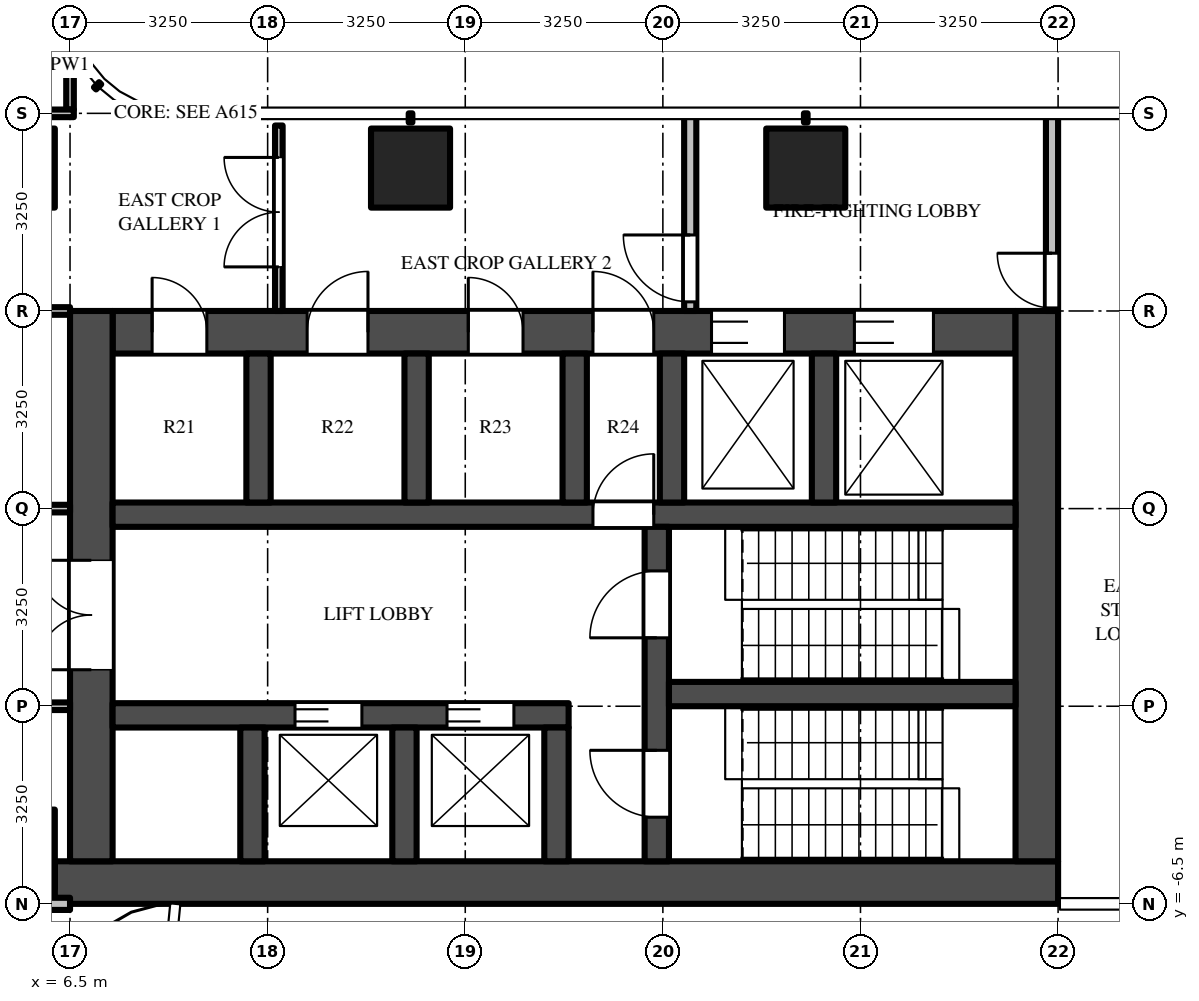
"""IFC4 building model, lengths in metres.
Left out: names, types, materials, properties, quantities, classifications, styles, units other than length and angle.
Written with IfcOpenShell. Run it as: python <this file> out.ifc"""

import sys

from ifc_helpers import new_model, si_unit, direction, frame, frame_2d, origin, origin_2d, place, context, subcontext, project, spatial, rectangle, extrude, source, transform, mapped, element, fill, save


model = new_model("IFC4")
c1 = context("Model", 3, precision=1e-05, world=origin(), true_north=direction((0.0, 1.0)))
c2 = subcontext(c1, "Body", "Model", "MODEL_VIEW")
j1 = project(units=[si_unit("LENGTHUNIT", "METRE"), si_unit("PLANEANGLEUNIT", "RADIAN")], contexts=[c1])
p1 = place(None, origin())
s1 = spatial("IfcSite", under=j1, at=p1, CompositionType="ELEMENT")
p2 = place(p1, origin())
s2 = spatial("IfcBuilding", under=s1, at=p2, CompositionType="ELEMENT")
p3 = place(p2, frame((0.0, 0.0, 124.5)))
s3 = spatial("IfcBuildingStorey", under=s2, at=p3, CompositionType="ELEMENT", Elevation=124.5)
m1 = source(origin(), c2, "Body", "SweptSolid", [
    extrude(rectangle(XDim=1.3, YDim=1.3, at=origin_2d()), origin(), (0.0, 0.0, 1.0), 4.5),
])
for number, where, z_axis, x_axis in (
    (1, (12.1, 5.6, 0.0), (0.0, 0.0, 1.0), (1.0, 0.0, 0.0)),
    (2, (18.6, 5.6, 0.0), (0.0, 0.0, 1.0), (1.0, 0.0, 0.0)),
    (3, (5.6, 5.6, 0.0), (0.0, 0.0, 1.0), (1.0, 0.0, 0.0)),
    (4, (5.6, -5.6, 0.0), (0.0, 0.0, 1.0), (1.0, 0.0, 0.0)),
):
    element("IfcColumn", number, at=place(p3, frame(where, z_axis=z_axis, x_axis=x_axis)), inside=s3, PredefinedType="COLUMN", context=c2, shape_type="MappedRepresentation", body=[
        mapped(m1, transform((0.0, 0.0, 0.0))),
    ])
m2 = source(origin(), c2, "Body", "SweptSolid", [
    extrude(rectangle(XDim=16.5, YDim=0.7, at=frame_2d((8.25, 0.0))), origin(), (0.0, 0.0, 1.0), 4.25),
])
p4 = place(p3, frame((6.25, -6.15, 0.0), z_axis=(0.0, 0.0, 1.0), x_axis=(1.0, 0.0, 0.0)))
e5 = element("IfcWall", 5, at=p4, inside=s3, PredefinedType="SHEAR", context=c2, shape_type="MappedRepresentation", body=[
    mapped(m2, transform((0.0, 0.0, 0.0))),
])
m3 = source(origin(), c2, "Body", "SweptSolid", [
    extrude(rectangle(XDim=14.85, YDim=0.7, at=frame_2d((7.425, 0.0))), origin(), (0.0, 0.0, 1.0), 4.25),
])
p5 = place(p3, frame((7.2, 2.9, 0.0), z_axis=(0.0, 0.0, 1.0), x_axis=(1.0, 0.0, 0.0)))
e6 = element("IfcWall", 6, at=p5, inside=s3, PredefinedType="SHEAR", context=c2, shape_type="MappedRepresentation", body=[
    mapped(m3, transform((0.0, 0.0, 0.0))),
])
m4 = source(origin(), c2, "Body", "SweptSolid", [
    extrude(rectangle(XDim=1.3, YDim=2.1, at=frame_2d((0.65, 1.05))), frame((0.0, 0.36, 0.0), z_axis=(0.0, -1.0, 0.0), x_axis=(1.0, 0.0, 0.0)), (0.0, 0.0, 1.0), 0.72),
])
p6 = place(p5, frame((12.2, 0.0, 0.0)))
e7 = element("IfcOpeningElement", 7, at=p6, cuts=e6, PredefinedType="OPENING", context=c2, shape_type="MappedRepresentation", body=[
    mapped(m4, transform((0.0, 0.0, 0.0))),
])
m5 = source(origin(), c2, "Body", "SweptSolid", [
    extrude(rectangle(XDim=1.2, YDim=2.1, at=frame_2d((0.6, 1.05))), frame((0.0, 0.36, 0.0), z_axis=(0.0, -1.0, 0.0), x_axis=(1.0, 0.0, 0.0)), (0.0, 0.0, 1.0), 0.72),
])
p7 = place(p5, frame((9.85, 0.0, 0.0)))
e8 = element("IfcOpeningElement", 8, at=p7, cuts=e6, PredefinedType="OPENING", context=c2, shape_type="MappedRepresentation", body=[
    mapped(m5, transform((0.0, 0.0, 0.0))),
])
m6 = source(origin(), c2, "Body", "SweptSolid", [
    extrude(rectangle(XDim=1.0, YDim=2.1, at=frame_2d((0.5, 1.05))), frame((0.0, 0.36, 0.0), z_axis=(0.0, -1.0, 0.0), x_axis=(1.0, 0.0, 0.0)), (0.0, 0.0, 1.0), 0.72),
])
p8 = place(p5, frame((7.9, 0.0, 0.0)))
e9 = element("IfcOpeningElement", 9, at=p8, cuts=e6, PredefinedType="OPENING", context=c2, shape_type="MappedRepresentation", body=[
    mapped(m6, transform((0.0, 0.0, 0.0))),
])
m7 = source(origin(), c2, "Body", "SweptSolid", [
    extrude(rectangle(XDim=0.9, YDim=2.1, at=frame_2d((0.45, 1.05))), frame((0.0, 0.36, 0.0), z_axis=(0.0, -1.0, 0.0), x_axis=(1.0, 0.0, 0.0)), (0.0, 0.0, 1.0), 0.72),
])
p9 = place(p5, frame((0.65, 0.0, 0.0)))
e10 = element("IfcOpeningElement", 10, at=p9, cuts=e6, PredefinedType="OPENING", context=c2, shape_type="MappedRepresentation", body=[
    mapped(m7, transform((0.0, 0.0, 0.0))),
])
p10 = place(p5, frame((3.2, 0.0, 0.0)))
e11 = element("IfcOpeningElement", 11, at=p10, cuts=e6, PredefinedType="OPENING", context=c2, shape_type="MappedRepresentation", body=[
    mapped(m6, transform((0.0, 0.0, 0.0))),
])
p11 = place(p5, frame((5.85, 0.0, 0.0)))
e12 = element("IfcOpeningElement", 12, at=p11, cuts=e6, PredefinedType="OPENING", context=c2, shape_type="MappedRepresentation", body=[
    mapped(m7, transform((0.0, 0.0, 0.0))),
])
m8 = source(origin(), c2, "Body", "SweptSolid", [
    extrude(rectangle(XDim=9.05, YDim=0.7, at=frame_2d((4.525, 0.0))), origin(), (0.0, 0.0, 1.0), 4.25),
])
p12 = place(p3, frame((6.85, -5.8, 0.0), z_axis=(0.0, 0.0, 1.0), x_axis=(0.0, 1.0, 0.0)))
e13 = element("IfcWall", 13, at=p12, inside=s3, PredefinedType="SHEAR", context=c2, shape_type="MappedRepresentation", body=[
    mapped(m8, transform((0.0, 0.0, 0.0))),
])
m9 = source(origin(), c2, "Body", "SweptSolid", [
    extrude(rectangle(XDim=1.8, YDim=2.1, at=frame_2d((0.9, 1.05))), frame((0.0, 0.36, 0.0), z_axis=(0.0, -1.0, 0.0), x_axis=(1.0, 0.0, 0.0)), (0.0, 0.0, 1.0), 0.72),
])
p13 = place(p12, frame((3.15, 0.0, 0.0)))
e14 = element("IfcOpeningElement", 14, at=p13, cuts=e13, PredefinedType="OPENING", context=c2, shape_type="MappedRepresentation", body=[
    mapped(m9, transform((0.0, 0.0, 0.0))),
])
p14 = place(p3, frame((22.4, -5.8, 0.0), z_axis=(0.0, 0.0, 1.0), x_axis=(0.0, 1.0, 0.0)))
e15 = element("IfcWall", 15, at=p14, inside=s3, PredefinedType="SHEAR", context=c2, shape_type="MappedRepresentation", body=[
    mapped(m8, transform((0.0, 0.0, 0.0))),
])
m10 = source(origin(), c2, "Body", "SweptSolid", [
    extrude(rectangle(XDim=7.5, YDim=0.4, at=frame_2d((3.75, 0.0))), origin(), (0.0, 0.0, 1.0), 4.25),
])
p15 = place(p3, frame((7.2, -3.4, 0.0), z_axis=(0.0, 0.0, 1.0), x_axis=(1.0, 0.0, 0.0)))
e16 = element("IfcWall", 16, at=p15, inside=s3, PredefinedType="SHEAR", context=c2, shape_type="MappedRepresentation", body=[
    mapped(m10, transform((0.0, 0.0, 0.0))),
])
m11 = source(origin(), c2, "Body", "SweptSolid", [
    extrude(rectangle(XDim=1.1, YDim=2.1, at=frame_2d((0.55, 1.05))), frame((0.0, 0.21, 0.0), z_axis=(0.0, -1.0, 0.0), x_axis=(1.0, 0.0, 0.0)), (0.0, 0.0, 1.0), 0.42),
])
p16 = place(p15, frame((3.0, 0.0, 0.0)))
e17 = element("IfcOpeningElement", 17, at=p16, cuts=e16, PredefinedType="OPENING", context=c2, shape_type="MappedRepresentation", body=[
    mapped(m11, transform((0.0, 0.0, 0.0))),
])
p17 = place(p15, frame((5.5, 0.0, 0.0)))
e18 = element("IfcOpeningElement", 18, at=p17, cuts=e16, PredefinedType="OPENING", context=c2, shape_type="MappedRepresentation", body=[
    mapped(m11, transform((0.0, 0.0, 0.0))),
])
m12 = source(origin(), c2, "Body", "SweptSolid", [
    extrude(rectangle(XDim=14.85, YDim=0.4, at=frame_2d((7.425, 0.0))), origin(), (0.0, 0.0, 1.0), 4.25),
])
p18 = place(p3, frame((7.2, -0.1, 0.0), z_axis=(0.0, 0.0, 1.0), x_axis=(1.0, 0.0, 0.0)))
e19 = element("IfcWall", 19, at=p18, inside=s3, PredefinedType="SHEAR", context=c2, shape_type="MappedRepresentation", body=[
    mapped(m12, transform((0.0, 0.0, 0.0))),
])
m13 = source(origin(), c2, "Body", "SweptSolid", [
    extrude(rectangle(XDim=1.0, YDim=2.1, at=frame_2d((0.5, 1.05))), frame((0.0, 0.21, 0.0), z_axis=(0.0, -1.0, 0.0), x_axis=(1.0, 0.0, 0.0)), (0.0, 0.0, 1.0), 0.42),
])
p19 = place(p18, frame((7.9, 0.0, 0.0)))
e20 = element("IfcOpeningElement", 20, at=p19, cuts=e19, PredefinedType="OPENING", context=c2, shape_type="MappedRepresentation", body=[
    mapped(m13, transform((0.0, 0.0, 0.0))),
])
m14 = source(origin(), c2, "Body", "SweptSolid", [
    extrude(rectangle(XDim=5.5, YDim=0.4, at=frame_2d((2.75, 0.0))), origin(), (0.0, 0.0, 1.0), 4.25),
])
p20 = place(p3, frame((16.15, -5.8, 0.0), z_axis=(0.0, 0.0, 1.0), x_axis=(0.0, 1.0, 0.0)))
e21 = element("IfcWall", 21, at=p20, inside=s3, PredefinedType="SHEAR", context=c2, shape_type="MappedRepresentation", body=[
    mapped(m14, transform((0.0, 0.0, 0.0))),
])
p21 = place(p20, frame((0.725, 0.0, 0.0)))
e22 = element("IfcOpeningElement", 22, at=p21, cuts=e21, PredefinedType="OPENING", context=c2, shape_type="MappedRepresentation", body=[
    mapped(m11, transform((0.0, 0.0, 0.0))),
])
p22 = place(p20, frame((3.675, 0.0, 0.0)))
e23 = element("IfcOpeningElement", 23, at=p22, cuts=e21, PredefinedType="OPENING", context=c2, shape_type="MappedRepresentation", body=[
    mapped(m11, transform((0.0, 0.0, 0.0))),
])
m15 = source(origin(), c2, "Body", "SweptSolid", [
    extrude(rectangle(XDim=5.7, YDim=0.4, at=frame_2d((2.85, 0.0))), origin(), (0.0, 0.0, 1.0), 4.25),
])
p23 = place(p3, frame((16.35, -3.05, 0.0), z_axis=(0.0, 0.0, 1.0), x_axis=(1.0, 0.0, 0.0)))
e24 = element("IfcWall", 24, at=p23, inside=s3, PredefinedType="SHEAR", context=c2, shape_type="MappedRepresentation", body=[
    mapped(m15, transform((0.0, 0.0, 0.0))),
])
m16 = source(origin(), c2, "Body", "SweptSolid", [
    extrude(rectangle(XDim=2.2, YDim=0.4, at=frame_2d((1.1, 0.0))), origin(), (0.0, 0.0, 1.0), 4.25),
])
for number, where, z_axis, x_axis in (
    (25, (9.5, -5.8, 0.0), (0.0, 0.0, 1.0), (0.0, 1.0, 0.0)),
    (26, (12.0, -5.8, 0.0), (0.0, 0.0, 1.0), (0.0, 1.0, 0.0)),
    (27, (14.5, -5.8, 0.0), (0.0, 0.0, 1.0), (0.0, 1.0, 0.0)),
):
    element("IfcWall", number, at=place(p3, frame(where, z_axis=z_axis, x_axis=x_axis)), inside=s3, PredefinedType="SHEAR", context=c2, shape_type="MappedRepresentation", body=[
        mapped(m16, transform((0.0, 0.0, 0.0))),
    ])
m17 = source(origin(), c2, "Body", "SweptSolid", [
    extrude(rectangle(XDim=2.45, YDim=0.4, at=frame_2d((1.225, 0.0))), origin(), (0.0, 0.0, 1.0), 4.25),
])
for number, where, z_axis, x_axis in (
    (28, (9.6, 0.1, 0.0), (0.0, 0.0, 1.0), (0.0, 1.0, 0.0)),
    (29, (12.2, 0.1, 0.0), (0.0, 0.0, 1.0), (0.0, 1.0, 0.0)),
    (30, (14.8, 0.1, 0.0), (0.0, 0.0, 1.0), (0.0, 1.0, 0.0)),
    (31, (16.4, 0.1, 0.0), (0.0, 0.0, 1.0), (0.0, 1.0, 0.0)),
    (32, (18.9, 0.1, 0.0), (0.0, 0.0, 1.0), (0.0, 1.0, 0.0)),
):
    element("IfcWall", number, at=place(p3, frame(where, z_axis=z_axis, x_axis=x_axis)), inside=s3, PredefinedType="SHEAR", context=c2, shape_type="MappedRepresentation", body=[
        mapped(m17, transform((0.0, 0.0, 0.0))),
    ])
m18 = source(origin(), c2, "Body", "SweptSolid", [
    extrude(rectangle(XDim=3.25, YDim=0.2, at=frame_2d((1.625, 0.0))), origin(), (0.0, 0.0, 1.0), 4.25),
])
p24 = place(p3, frame((16.7, 3.25, 0.0), z_axis=(0.0, 0.0, 1.0), x_axis=(0.0, 1.0, 0.0)))
e33 = element("IfcWall", 33, at=p24, inside=s3, PredefinedType="PARTITIONING", context=c2, shape_type="MappedRepresentation", body=[
    mapped(m18, transform((0.0, 0.0, 0.0))),
])
m19 = source(origin(), c2, "Body", "SweptSolid", [
    extrude(rectangle(XDim=1.1, YDim=2.1, at=frame_2d((0.55, 1.05))), frame((0.0, 0.11, 0.0), z_axis=(0.0, -1.0, 0.0), x_axis=(1.0, 0.0, 0.0)), (0.0, 0.0, 1.0), 0.22),
])
p25 = place(p24, frame((0.15, 0.0, 0.0)))
e34 = element("IfcOpeningElement", 34, at=p25, cuts=e33, PredefinedType="OPENING", context=c2, shape_type="MappedRepresentation", body=[
    mapped(m19, transform((0.0, 0.0, 0.0))),
])
p26 = place(p3, frame((22.65, 3.25, 0.0), z_axis=(0.0, 0.0, 1.0), x_axis=(0.0, 1.0, 0.0)))
e35 = element("IfcWall", 35, at=p26, inside=s3, PredefinedType="PARTITIONING", context=c2, shape_type="MappedRepresentation", body=[
    mapped(m18, transform((0.0, 0.0, 0.0))),
])
m20 = source(origin(), c2, "Body", "SweptSolid", [
    extrude(rectangle(XDim=0.9, YDim=2.1, at=frame_2d((0.45, 1.05))), frame((0.0, 0.11, 0.0), z_axis=(0.0, -1.0, 0.0), x_axis=(1.0, 0.0, 0.0)), (0.0, 0.0, 1.0), 0.22),
])
p27 = place(p26, frame((0.05, 0.0, 0.0)))
e36 = element("IfcOpeningElement", 36, at=p27, cuts=e35, PredefinedType="OPENING", context=c2, shape_type="MappedRepresentation", body=[
    mapped(m20, transform((0.0, 0.0, 0.0))),
])
m21 = source(origin(), c2, "Body", "SweptSolid", [
    extrude(rectangle(XDim=1.469, YDim=0.125, at=frame_2d((0.734, 0.0))), origin(), (0.0, 0.0, 1.0), 4.25),
])
p28 = place(p3, frame((6.5, 6.562, 0.0), z_axis=(0.0, 0.0, 1.0), x_axis=(0.0, 1.0, 0.0)))
e37 = element("IfcWall", 37, at=p28, inside=s3, PredefinedType="PARTITIONING", context=c2, shape_type="MappedRepresentation", body=[
    mapped(m21, transform((0.0, 0.0, 0.0))),
])
m22 = source(origin(), c2, "Body", "SweptSolid", [
    extrude(rectangle(XDim=3.05, YDim=0.125, at=frame_2d((1.525, 0.0))), origin(), (0.0, 0.0, 1.0), 3.33),
])
p29 = place(p3, frame((9.934, 3.25, 0.0), z_axis=(0.0, 0.0, 1.0), x_axis=(0.0, 1.0, 0.0)))
e38 = element("IfcWall", 38, at=p29, inside=s3, PredefinedType="PARTITIONING", context=c2, shape_type="MappedRepresentation", body=[
    mapped(m22, transform((0.0, 0.0, 0.0))),
])
m23 = source(origin(), c2, "Body", "SweptSolid", [
    extrude(rectangle(XDim=1.8, YDim=2.1, at=frame_2d((0.9, 1.05))), frame((0.0, 0.073, 0.0), z_axis=(0.0, -1.0, 0.0), x_axis=(1.0, 0.0, 0.0)), (0.0, 0.0, 1.0), 0.145),
])
p30 = place(p29, frame((0.725, 0.0, 0.0)))
e39 = element("IfcOpeningElement", 39, at=p30, cuts=e38, PredefinedType="OPENING", context=c2, shape_type="MappedRepresentation", body=[
    mapped(m23, transform((0.0, 0.0, 0.0))),
])
m24 = source(origin(), c2, "Body", "SweptSolid", [
    extrude(rectangle(XDim=2.75, YDim=0.2, at=frame_2d((1.375, 0.0))), origin(), (0.0, 0.0, 1.0), 3.33),
])
p31 = place(p3, frame((3.75, -6.5, 0.0), z_axis=(0.0, 0.0, 1.0), x_axis=(1.0, 0.0, 0.0)))
e40 = element("IfcWall", 40, at=p31, inside=s3, PredefinedType="PARTITIONING", context=c2, shape_type="MappedRepresentation", body=[
    mapped(m24, transform((0.0, 0.0, 0.0))),
])
m25 = source(origin(), c2, "Body", "SweptSolid", [
    extrude(rectangle(XDim=5.363, YDim=0.125, at=frame_2d((2.681, 0.0))), origin(), (0.0, 0.0, 1.0), 3.468),
])
p32 = place(p3, frame((6.5, -3.25, 0.0), z_axis=(0.0, 0.0, 1.0), x_axis=(-1.0, 0.0, 0.0)))
e41 = element("IfcWall", 41, at=p32, inside=s3, PredefinedType="PARTITIONING", context=c2, shape_type="MappedRepresentation", body=[
    mapped(m25, transform((0.0, 0.0, 0.0))),
])
m26 = source(origin(), c2, "Body", "SweptSolid", [
    extrude(rectangle(XDim=1.0, YDim=2.1, at=frame_2d((0.5, 1.05))), frame((0.0, 0.073, 0.0), z_axis=(0.0, -1.0, 0.0), x_axis=(1.0, 0.0, 0.0)), (0.0, 0.0, 1.0), 0.145),
])
p33 = place(p32, frame((0.35, 0.0, 0.0)))
e42 = element("IfcOpeningElement", 42, at=p33, cuts=e41, PredefinedType="OPENING", context=c2, shape_type="MappedRepresentation", body=[
    mapped(m26, transform((0.0, 0.0, 0.0))),
])
p34 = place(p3, frame((6.5, 0.0, 0.0), z_axis=(0.0, 0.0, 1.0), x_axis=(-1.0, 0.0, 0.0)))
e43 = element("IfcWall", 43, at=p34, inside=s3, PredefinedType="PARTITIONING", context=c2, shape_type="MappedRepresentation", body=[
    mapped(m25, transform((0.0, 0.0, 0.0))),
])
p35 = place(p34, frame((3.95, 0.0, 0.0)))
e44 = element("IfcOpeningElement", 44, at=p35, cuts=e43, PredefinedType="OPENING", context=c2, shape_type="MappedRepresentation", body=[
    mapped(m26, transform((0.0, 0.0, 0.0))),
])
p36 = place(p3, frame((1.137, 3.25, 0.0), z_axis=(0.0, 0.0, 1.0), x_axis=(1.0, 0.0, 0.0)))
e45 = element("IfcWall", 45, at=p36, inside=s3, PredefinedType="PARTITIONING", context=c2, shape_type="MappedRepresentation", body=[
    mapped(m25, transform((0.0, 0.0, 0.0))),
])
m27 = source(origin(), c2, "Body", "SweptSolid", [
    extrude(rectangle(XDim=3.725, YDim=0.125, at=frame_2d((1.863, 0.0))), origin(), (0.0, 0.0, 1.0), 3.33),
])
p37 = place(p3, frame((2.837, 6.5, 0.0), z_axis=(0.0, 0.0, 1.0), x_axis=(1.0, 0.0, 0.0)))
e46 = element("IfcWall", 46, at=p37, inside=s3, PredefinedType="PARTITIONING", context=c2, shape_type="MappedRepresentation", body=[
    mapped(m27, transform((0.0, 0.0, 0.0))),
])
m28 = source(origin(), c2, "Body", "SweptSolid", [
    extrude(rectangle(XDim=1.1, YDim=2.1, at=frame_2d((0.55, 1.05))), frame((0.0, 0.025, 0.0), z_axis=(0.0, -1.0, 0.0), x_axis=(1.0, 0.0, 0.0)), (0.0, 0.0, 1.0), 0.05),
])
p38 = place(p16, origin())
e47 = element("IfcDoor", 47, at=p38, inside=s3, OperationType="DOUBLE_DOOR_SLIDING", PredefinedType="DOOR", context=c2, shape_type="MappedRepresentation", body=[
    mapped(m28, transform((0.0, 0.0, 0.0))),
])
fill(e17, e47)
p39 = place(p17, origin())
e48 = element("IfcDoor", 48, at=p39, inside=s3, OperationType="DOUBLE_DOOR_SLIDING", PredefinedType="DOOR", context=c2, shape_type="MappedRepresentation", body=[
    mapped(m28, transform((0.0, 0.0, 0.0))),
])
fill(e18, e48)
m29 = source(origin(), c2, "Body", "SweptSolid", [
    extrude(rectangle(XDim=1.3, YDim=2.1, at=frame_2d((0.65, 1.05))), frame((0.0, -0.275, 0.0), z_axis=(0.0, -1.0, 0.0), x_axis=(1.0, 0.0, 0.0)), (0.0, 0.0, 1.0), 0.05),
])
p40 = place(p6, origin())
e49 = element("IfcDoor", 49, at=p40, inside=s3, OperationType="DOUBLE_DOOR_SLIDING", PredefinedType="DOOR", context=c2, shape_type="MappedRepresentation", body=[
    mapped(m29, transform((0.0, 0.0, 0.0))),
])
fill(e7, e49)
m30 = source(origin(), c2, "Body", "SweptSolid", [
    extrude(rectangle(XDim=1.2, YDim=2.1, at=frame_2d((0.6, 1.05))), frame((0.0, -0.275, 0.0), z_axis=(0.0, -1.0, 0.0), x_axis=(1.0, 0.0, 0.0)), (0.0, 0.0, 1.0), 0.05),
])
p41 = place(p7, origin())
e50 = element("IfcDoor", 50, at=p41, inside=s3, OperationType="DOUBLE_DOOR_SLIDING", PredefinedType="DOOR", context=c2, shape_type="MappedRepresentation", body=[
    mapped(m30, transform((0.0, 0.0, 0.0))),
])
fill(e8, e50)
m31 = source(origin(), c2, "Body", "SweptSolid", [
    extrude(rectangle(XDim=1.8, YDim=2.1, at=frame_2d((0.9, 1.05))), frame((0.0, -0.275, 0.0), z_axis=(0.0, -1.0, 0.0), x_axis=(1.0, 0.0, 0.0)), (0.0, 0.0, 1.0), 0.05),
])
p42 = place(p13, origin())
e51 = element("IfcDoor", 51, at=p42, inside=s3, OperationType="DOUBLE_DOOR_SINGLE_SWING", PredefinedType="DOOR", context=c2, shape_type="MappedRepresentation", body=[
    mapped(m31, transform((0.0, 0.0, 0.0))),
])
fill(e14, e51)
p43 = place(p21, origin())
e52 = element("IfcDoor", 52, at=p43, inside=s3, OperationType="SINGLE_SWING_RIGHT", PredefinedType="DOOR", context=c2, shape_type="MappedRepresentation", body=[
    mapped(m28, transform((0.0, 0.0, 0.0))),
])
fill(e22, e52)
p44 = place(p22, origin())
e53 = element("IfcDoor", 53, at=p44, inside=s3, OperationType="SINGLE_SWING_LEFT", PredefinedType="DOOR", context=c2, shape_type="MappedRepresentation", body=[
    mapped(m28, transform((0.0, 0.0, 0.0))),
])
fill(e23, e53)
m32 = source(origin(), c2, "Body", "SweptSolid", [
    extrude(rectangle(XDim=1.0, YDim=2.1, at=frame_2d((0.5, 1.05))), frame((0.0, 0.025, 0.0), z_axis=(0.0, -1.0, 0.0), x_axis=(1.0, 0.0, 0.0)), (0.0, 0.0, 1.0), 0.05),
])
p45 = place(p19, origin())
e54 = element("IfcDoor", 54, at=p45, inside=s3, OperationType="SINGLE_SWING_RIGHT", PredefinedType="DOOR", context=c2, shape_type="MappedRepresentation", body=[
    mapped(m32, transform((0.0, 0.0, 0.0))),
])
fill(e20, e54)
m33 = source(origin(), c2, "Body", "SweptSolid", [
    extrude(rectangle(XDim=1.0, YDim=2.1, at=frame_2d((0.5, 1.05))), frame((0.0, -0.275, 0.0), z_axis=(0.0, -1.0, 0.0), x_axis=(1.0, 0.0, 0.0)), (0.0, 0.0, 1.0), 0.05),
])
p46 = place(p8, origin())
e55 = element("IfcDoor", 55, at=p46, inside=s3, OperationType="SINGLE_SWING_LEFT", PredefinedType="DOOR", context=c2, shape_type="MappedRepresentation", body=[
    mapped(m33, transform((0.0, 0.0, 0.0))),
])
fill(e9, e55)
p47 = place(p25, origin())
e56 = element("IfcDoor", 56, at=p47, inside=s3, OperationType="SINGLE_SWING_RIGHT", PredefinedType="DOOR", context=c2, shape_type="MappedRepresentation", body=[
    mapped(m28, transform((0.0, 0.0, 0.0))),
])
fill(e34, e56)
m34 = source(origin(), c2, "Body", "SweptSolid", [
    extrude(rectangle(XDim=0.9, YDim=2.1, at=frame_2d((0.45, 1.05))), frame((0.0, 0.025, 0.0), z_axis=(0.0, -1.0, 0.0), x_axis=(1.0, 0.0, 0.0)), (0.0, 0.0, 1.0), 0.05),
])
p48 = place(p27, origin())
e57 = element("IfcDoor", 57, at=p48, inside=s3, OperationType="SINGLE_SWING_RIGHT", PredefinedType="DOOR", context=c2, shape_type="MappedRepresentation", body=[
    mapped(m34, transform((0.0, 0.0, 0.0))),
])
fill(e36, e57)
m35 = source(origin(), c2, "Body", "SweptSolid", [
    extrude(rectangle(XDim=0.9, YDim=2.1, at=frame_2d((0.45, 1.05))), frame((0.0, -0.275, 0.0), z_axis=(0.0, -1.0, 0.0), x_axis=(1.0, 0.0, 0.0)), (0.0, 0.0, 1.0), 0.05),
])
p49 = place(p9, origin())
e58 = element("IfcDoor", 58, at=p49, inside=s3, OperationType="SINGLE_SWING_LEFT", PredefinedType="DOOR", context=c2, shape_type="MappedRepresentation", body=[
    mapped(m35, transform((0.0, 0.0, 0.0))),
])
fill(e10, e58)
p50 = place(p10, origin())
e59 = element("IfcDoor", 59, at=p50, inside=s3, OperationType="SINGLE_SWING_RIGHT", PredefinedType="DOOR", context=c2, shape_type="MappedRepresentation", body=[
    mapped(m33, transform((0.0, 0.0, 0.0))),
])
fill(e11, e59)
p51 = place(p11, origin())
e60 = element("IfcDoor", 60, at=p51, inside=s3, OperationType="SINGLE_SWING_LEFT", PredefinedType="DOOR", context=c2, shape_type="MappedRepresentation", body=[
    mapped(m35, transform((0.0, 0.0, 0.0))),
])
fill(e12, e60)
m36 = source(origin(), c2, "Body", "SweptSolid", [
    extrude(rectangle(XDim=1.8, YDim=2.1, at=frame_2d((0.9, 1.05))), frame((0.0, 0.025, 0.0), z_axis=(0.0, -1.0, 0.0), x_axis=(1.0, 0.0, 0.0)), (0.0, 0.0, 1.0), 0.05),
])
p52 = place(p30, origin())
e61 = element("IfcDoor", 61, at=p52, inside=s3, OperationType="DOUBLE_DOOR_SINGLE_SWING", PredefinedType="DOOR", context=c2, shape_type="MappedRepresentation", body=[
    mapped(m36, transform((0.0, 0.0, 0.0))),
])
fill(e39, e61)
save(model, sys.argv[1])
